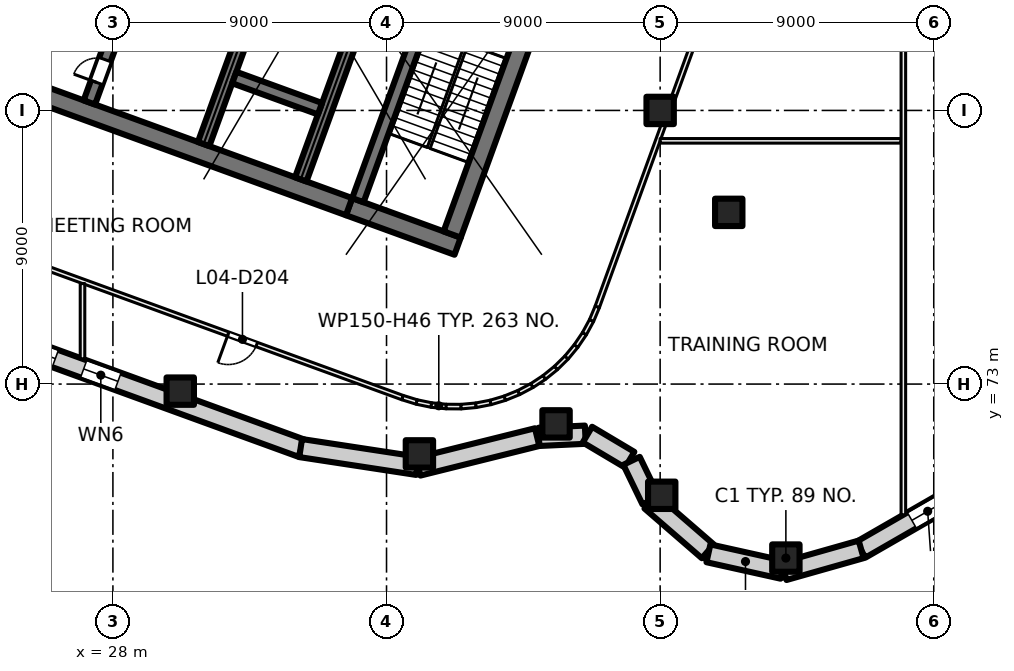
"""IFC4 building model, lengths in metres.
Left out: names, types, materials, properties, quantities, classifications, styles, units other than length and angle.
Written with IfcOpenShell. Run it as: python <this file> out.ifc"""

import sys

from ifc_helpers import new_model, si_unit, direction, frame, frame_2d, origin, origin_2d, place, context, subcontext, project, spatial, rectangle, extrude, element, fill, save


model = new_model("IFC4")
c1 = context("Model", 3, precision=1e-05, world=origin(), true_north=direction((0.0, 1.0)))
c2 = subcontext(c1, "Body", "Model", "MODEL_VIEW")
j1 = project(units=[si_unit("LENGTHUNIT", "METRE"), si_unit("PLANEANGLEUNIT", "RADIAN")], contexts=[c1])
p1 = place(None, origin())
s1 = spatial("IfcSite", under=j1, at=p1, CompositionType="ELEMENT")
p2 = place(p1, origin())
s2 = spatial("IfcBuilding", under=s1, at=p2, CompositionType="ELEMENT")
p3 = place(p2, frame((0.0, 0.0, 22.5)))
s3 = spatial("IfcBuildingStorey", under=s2, at=p3, CompositionType="ELEMENT", Elevation=22.5)
for number, where, z_axis, x_axis in (
    (1, (46.0, 82.0, 0.0), (0.0, 0.0, 1.0), (1.0, 0.0, 0.0)),
    (2, (50.135, 67.277, 0.0), (0.0, 0.0, 1.0), (1.0, 0.0, 0.0)),
    (3, (46.052, 69.342, 0.0), (0.0, 0.0, 1.0), (1.0, 0.0, 0.0)),
    (4, (42.576, 71.691, 0.0), (0.0, 0.0, 1.0), (1.0, 0.0, 0.0)),
    (5, (38.082, 70.704, 0.0), (0.0, 0.0, 1.0), (1.0, 0.0, 0.0)),
    (6, (30.215, 72.768, 0.0), (0.0, 0.0, 1.0), (1.0, 0.0, 0.0)),
    (7, (48.257, 78.648, 0.0), (0.0, 0.0, 1.0), (1.0, 0.0, 0.0)),
):
    element("IfcColumn", number, at=place(p3, frame(where, z_axis=z_axis, x_axis=x_axis)), inside=s3, PredefinedType="COLUMN", context=c2, shape_type="SweptSolid", body=[
        extrude(rectangle(XDim=0.9, YDim=0.9, at=origin_2d()), origin(), (0.0, 0.0, 1.0), 5.0),
    ])
p4 = place(p3, frame((39.338, 77.535, 0.0), z_axis=(0.0, 0.0, 1.0), x_axis=(-0.939701471648, 0.341995824804, 0.0)))
e8 = element("IfcWall", 8, at=p4, inside=s3, PredefinedType="SHEAR", context=c2, shape_type="SweptSolid", body=[
    extrude(rectangle(XDim=3.8, YDim=0.6, at=frame_2d((1.9, 0.0))), origin(), (0.0, 0.0, 1.0), 5.0),
])
p5 = place(p3, frame((35.767, 78.835, 0.0), z_axis=(0.0, 0.0, 1.0), x_axis=(-0.939692894512, 0.342019391267, 0.0)))
e9 = element("IfcWall", 9, at=p5, inside=s3, PredefinedType="SHEAR", context=c2, shape_type="SweptSolid", body=[
    extrude(rectangle(XDim=14.4, YDim=0.6, at=frame_2d((7.2, 0.0))), origin(), (0.0, 0.0, 1.0), 5.0),
])
p6 = place(p3, frame((39.159, 77.92, 0.0), z_axis=(0.0, 0.0, 1.0), x_axis=(0.342016982193, 0.939693771338, 0.0)))
e10 = element("IfcWall", 10, at=p6, inside=s3, PredefinedType="SHEAR", context=c2, shape_type="SweptSolid", body=[
    extrude(rectangle(XDim=7.8, YDim=0.6, at=frame_2d((3.9, 0.0))), origin(), (0.0, 0.0, 1.0), 5.0),
])
p7 = place(p3, frame((36.058, 79.048, 0.0), z_axis=(0.0, 0.0, 1.0), x_axis=(0.342016982193, 0.939693771338, 0.0)))
e11 = element("IfcWall", 11, at=p7, inside=s3, PredefinedType="SHEAR", context=c2, shape_type="SweptSolid", body=[
    extrude(rectangle(XDim=7.8, YDim=0.4, at=frame_2d((3.9, 0.0))), origin(), (0.0, 0.0, 1.0), 5.0),
])
p8 = place(p3, frame((30.984, 80.895, 0.0), z_axis=(0.0, 0.0, 1.0), x_axis=(0.342021021735, 0.939692301071, 0.0)))
e12 = element("IfcWall", 12, at=p8, inside=s3, PredefinedType="SHEAR", context=c2, shape_type="SweptSolid", body=[
    extrude(rectangle(XDim=12.2, YDim=0.4, at=frame_2d((6.1, 0.0))), origin(), (0.0, 0.0, 1.0), 5.0),
])
p9 = place(p8, frame((5.45, 0.0, 0.0)))
e13 = element("IfcOpeningElement", 13, at=p9, cuts=e12, PredefinedType="OPENING", context=c2, shape_type="SweptSolid", body=[
    extrude(rectangle(XDim=1.1, YDim=2.1, at=frame_2d((0.55, 1.05))), frame((0.0, 0.21, 0.0), z_axis=(0.0, -1.0, 0.0), x_axis=(1.0, 0.0, 0.0)), (0.0, 0.0, 1.0), 0.42),
])
p10 = place(p8, frame((7.85, 0.0, 0.0)))
e14 = element("IfcOpeningElement", 14, at=p10, cuts=e12, PredefinedType="OPENING", context=c2, shape_type="SweptSolid", body=[
    extrude(rectangle(XDim=1.1, YDim=2.1, at=frame_2d((0.55, 1.05))), frame((0.0, 0.21, 0.0), z_axis=(0.0, -1.0, 0.0), x_axis=(1.0, 0.0, 0.0)), (0.0, 0.0, 1.0), 0.42),
])
p11 = place(p8, frame((10.25, 0.0, 0.0)))
e15 = element("IfcOpeningElement", 15, at=p11, cuts=e12, PredefinedType="OPENING", context=c2, shape_type="SweptSolid", body=[
    extrude(rectangle(XDim=1.1, YDim=2.1, at=frame_2d((0.55, 1.05))), frame((0.0, 0.21, 0.0), z_axis=(0.0, -1.0, 0.0), x_axis=(1.0, 0.0, 0.0)), (0.0, 0.0, 1.0), 0.42),
])
p12 = place(p3, frame((34.178, 79.732, 0.0), z_axis=(0.0, 0.0, 1.0), x_axis=(0.342014590177, 0.939694641948, 0.0)))
e16 = element("IfcWall", 16, at=p12, inside=s3, PredefinedType="SHEAR", context=c2, shape_type="SweptSolid", body=[
    extrude(rectangle(XDim=12.2, YDim=0.4, at=frame_2d((6.1, 0.0))), origin(), (0.0, 0.0, 1.0), 5.0),
])
p13 = place(p3, frame((34.812, 82.056, 0.0), z_axis=(0.0, 0.0, 1.0), x_axis=(-0.939686455819, 0.342037080957, 0.0)))
e17 = element("IfcWall", 17, at=p13, inside=s3, PredefinedType="SHEAR", context=c2, shape_type="SweptSolid", body=[
    extrude(rectangle(XDim=3.0, YDim=0.4, at=frame_2d((1.5, 0.0))), origin(), (0.0, 0.0, 1.0), 5.0),
])
p14 = place(p3, frame((27.225, 82.263, 0.0), z_axis=(0.0, 0.0, 1.0), x_axis=(0.342014590177, 0.939694641948, 0.0)))
e18 = element("IfcWall", 18, at=p14, inside=s3, PredefinedType="SHEAR", context=c2, shape_type="SweptSolid", body=[
    extrude(rectangle(XDim=12.2, YDim=0.4, at=frame_2d((6.1, 0.0))), origin(), (0.0, 0.0, 1.0), 5.0),
])
p15 = place(p14, frame((10.25, 0.0, 0.0)))
e19 = element("IfcOpeningElement", 19, at=p15, cuts=e18, PredefinedType="OPENING", context=c2, shape_type="SweptSolid", body=[
    extrude(rectangle(XDim=1.1, YDim=2.1, at=frame_2d((0.55, 1.05))), frame((0.0, 0.21, 0.0), z_axis=(0.0, -1.0, 0.0), x_axis=(1.0, 0.0, 0.0)), (0.0, 0.0, 1.0), 0.42),
])
p16 = place(p14, frame((0.7, 0.0, 0.0)))
e20 = element("IfcOpeningElement", 20, at=p16, cuts=e18, PredefinedType="OPENING", context=c2, shape_type="SweptSolid", body=[
    extrude(rectangle(XDim=0.8, YDim=2.1, at=frame_2d((0.4, 1.05))), frame((0.0, 0.21, 0.0), z_axis=(0.0, -1.0, 0.0), x_axis=(1.0, 0.0, 0.0)), (0.0, 0.0, 1.0), 0.42),
])
p17 = place(p3, frame((24.03, 83.426, 0.0), z_axis=(0.0, 0.0, 1.0), x_axis=(0.342014590177, 0.939694641948, 0.0)))
e21 = element("IfcWall", 21, at=p17, inside=s3, PredefinedType="SHEAR", context=c2, shape_type="SweptSolid", body=[
    extrude(rectangle(XDim=12.2, YDim=0.4, at=frame_2d((6.1, 0.0))), origin(), (0.0, 0.0, 1.0), 5.0),
])
p18 = place(p17, frame((7.9, 0.0, 0.0)))
e22 = element("IfcOpeningElement", 22, at=p18, cuts=e21, PredefinedType="OPENING", context=c2, shape_type="SweptSolid", body=[
    extrude(rectangle(XDim=1.1, YDim=2.1, at=frame_2d((0.55, 1.05))), frame((0.0, 0.21, 0.0), z_axis=(0.0, -1.0, 0.0), x_axis=(1.0, 0.0, 0.0)), (0.0, 0.0, 1.0), 0.42),
])
p19 = place(p3, frame((110.368, 100.798, 0.0), z_axis=(0.0, 0.0, 1.0), x_axis=(-0.866702553925, -0.498825303107, 0.0)))
e23 = element("IfcWall", 23, at=p19, inside=s3, PredefinedType="SOLIDWALL", context=c2, shape_type="SweptSolid", body=[
    extrude(rectangle(XDim=66.651, YDim=0.6, at=frame_2d((33.325, 0.0))), origin(), (0.0, 0.0, 1.0), 4.625),
])
p20 = place(p19, frame((0.794, 0.0, 0.9)))
e24 = element("IfcOpeningElement", 24, at=p20, cuts=e23, PredefinedType="OPENING", context=c2, shape_type="SweptSolid", body=[
    extrude(rectangle(XDim=3.0, YDim=3.0, at=frame_2d((1.5, 1.5))), frame((0.0, 0.31, 0.0), z_axis=(0.0, -1.0, 0.0), x_axis=(1.0, 0.0, 0.0)), (0.0, 0.0, 1.0), 0.62),
])
p21 = place(p19, frame((9.542, 0.0, 0.9)))
e25 = element("IfcOpeningElement", 25, at=p21, cuts=e23, PredefinedType="OPENING", context=c2, shape_type="SweptSolid", body=[
    extrude(rectangle(XDim=3.0, YDim=3.0, at=frame_2d((1.5, 1.5))), frame((0.0, 0.31, 0.0), z_axis=(0.0, -1.0, 0.0), x_axis=(1.0, 0.0, 0.0)), (0.0, 0.0, 1.0), 0.62),
])
p22 = place(p19, frame((18.439, 0.0, 0.9)))
e26 = element("IfcOpeningElement", 26, at=p22, cuts=e23, PredefinedType="OPENING", context=c2, shape_type="SweptSolid", body=[
    extrude(rectangle(XDim=3.0, YDim=3.0, at=frame_2d((1.5, 1.5))), frame((0.0, 0.31, 0.0), z_axis=(0.0, -1.0, 0.0), x_axis=(1.0, 0.0, 0.0)), (0.0, 0.0, 1.0), 0.62),
])
p23 = place(p19, frame((27.337, 0.0, 0.9)))
e27 = element("IfcOpeningElement", 27, at=p23, cuts=e23, PredefinedType="OPENING", context=c2, shape_type="SweptSolid", body=[
    extrude(rectangle(XDim=3.0, YDim=3.0, at=frame_2d((1.5, 1.5))), frame((0.0, 0.31, 0.0), z_axis=(0.0, -1.0, 0.0), x_axis=(1.0, 0.0, 0.0)), (0.0, 0.0, 1.0), 0.62),
])
p24 = place(p19, frame((36.234, 0.0, 0.9)))
e28 = element("IfcOpeningElement", 28, at=p24, cuts=e23, PredefinedType="OPENING", context=c2, shape_type="SweptSolid", body=[
    extrude(rectangle(XDim=3.0, YDim=3.0, at=frame_2d((1.5, 1.5))), frame((0.0, 0.31, 0.0), z_axis=(0.0, -1.0, 0.0), x_axis=(1.0, 0.0, 0.0)), (0.0, 0.0, 1.0), 0.62),
])
p25 = place(p19, frame((45.131, 0.0, 0.9)))
e29 = element("IfcOpeningElement", 29, at=p25, cuts=e23, PredefinedType="OPENING", context=c2, shape_type="SweptSolid", body=[
    extrude(rectangle(XDim=3.0, YDim=3.0, at=frame_2d((1.5, 1.5))), frame((0.0, 0.31, 0.0), z_axis=(0.0, -1.0, 0.0), x_axis=(1.0, 0.0, 0.0)), (0.0, 0.0, 1.0), 0.62),
])
p26 = place(p19, frame((54.029, 0.0, 0.9)))
e30 = element("IfcOpeningElement", 30, at=p26, cuts=e23, PredefinedType="OPENING", context=c2, shape_type="SweptSolid", body=[
    extrude(rectangle(XDim=3.0, YDim=3.0, at=frame_2d((1.5, 1.5))), frame((0.0, 0.31, 0.0), z_axis=(0.0, -1.0, 0.0), x_axis=(1.0, 0.0, 0.0)), (0.0, 0.0, 1.0), 0.62),
])
p27 = place(p19, frame((63.514, 0.0, 0.9)))
e31 = element("IfcOpeningElement", 31, at=p27, cuts=e23, PredefinedType="OPENING", context=c2, shape_type="SweptSolid", body=[
    extrude(rectangle(XDim=1.2, YDim=3.0, at=frame_2d((0.6, 1.5))), frame((0.0, 0.31, 0.0), z_axis=(0.0, -1.0, 0.0), x_axis=(1.0, 0.0, 0.0)), (0.0, 0.0, 1.0), 0.62),
])
p28 = place(p3, frame((34.204, 70.89, 0.0), z_axis=(0.0, 0.0, 1.0), x_axis=(-0.939693996621, 0.342016363227, 0.0)))
e32 = element("IfcWall", 32, at=p28, inside=s3, PredefinedType="SOLIDWALL", context=c2, shape_type="SweptSolid", body=[
    extrude(rectangle(XDim=16.926, YDim=0.6, at=frame_2d((8.463, 0.0))), origin(), (0.0, 0.0, 1.0), 4.625),
])
p29 = place(p28, frame((6.426, 0.0, 0.9)))
e33 = element("IfcOpeningElement", 33, at=p29, cuts=e32, PredefinedType="OPENING", context=c2, shape_type="SweptSolid", body=[
    extrude(rectangle(XDim=1.2, YDim=3.0, at=frame_2d((0.6, 1.5))), frame((0.0, 0.31, 0.0), z_axis=(0.0, -1.0, 0.0), x_axis=(1.0, 0.0, 0.0)), (0.0, 0.0, 1.0), 0.62),
])
p30 = place(p28, frame((8.618, 0.0, 0.9)))
e34 = element("IfcOpeningElement", 34, at=p30, cuts=e32, PredefinedType="OPENING", context=c2, shape_type="SweptSolid", body=[
    extrude(rectangle(XDim=3.0, YDim=3.0, at=frame_2d((1.5, 1.5))), frame((0.0, 0.31, 0.0), z_axis=(0.0, -1.0, 0.0), x_axis=(1.0, 0.0, 0.0)), (0.0, 0.0, 1.0), 0.62),
])
p31 = place(p3, frame((38.022, 70.308, 0.0), z_axis=(0.0, 0.0, 1.0), x_axis=(-0.98857030495, 0.150760578968, 0.0)))
e35 = element("IfcWall", 35, at=p31, inside=s3, PredefinedType="SOLIDWALL", context=c2, shape_type="SweptSolid", body=[
    extrude(rectangle(XDim=3.891, YDim=0.6, at=frame_2d((1.946, 0.0))), origin(), (0.0, 0.0, 1.0), 4.625),
])
p32 = place(p3, frame((41.954, 71.255, 0.0), z_axis=(0.0, 0.0, 1.0), x_axis=(-0.970377180078, -0.241594967628, 0.0)))
e36 = element("IfcWall", 36, at=p32, inside=s3, PredefinedType="SOLIDWALL", context=c2, shape_type="SweptSolid", body=[
    extrude(rectangle(XDim=4.031, YDim=0.6, at=frame_2d((2.016, 0.0))), origin(), (0.0, 0.0, 1.0), 4.625),
])
p33 = place(p3, frame((43.538, 71.335, 0.0), z_axis=(0.0, 0.0, 1.0), x_axis=(-0.998910056035, -0.046676546065, 0.0)))
e37 = element("IfcWall", 37, at=p33, inside=s3, PredefinedType="SOLIDWALL", context=c2, shape_type="SweptSolid", body=[
    extrude(rectangle(XDim=1.527, YDim=0.6, at=frame_2d((0.764, 0.0))), origin(), (0.0, 0.0, 1.0), 4.625),
])
p34 = place(p3, frame((44.998, 70.511, 0.0), z_axis=(0.0, 0.0, 1.0), x_axis=(-0.859405023985, 0.511295418275, 0.0)))
e38 = element("IfcWall", 38, at=p34, inside=s3, PredefinedType="SOLIDWALL", context=c2, shape_type="SweptSolid", body=[
    extrude(rectangle(XDim=1.617, YDim=0.6, at=frame_2d((0.809, 0.0))), origin(), (0.0, 0.0, 1.0), 4.625),
])
p35 = place(p3, frame((45.689, 69.173, 0.0), z_axis=(0.0, 0.0, 1.0), x_axis=(-0.435706421579, 0.900088836835, 0.0)))
e39 = element("IfcWall", 39, at=p35, inside=s3, PredefinedType="SOLIDWALL", context=c2, shape_type="SweptSolid", body=[
    extrude(rectangle(XDim=1.447, YDim=0.6, at=frame_2d((0.724, 0.0))), origin(), (0.0, 0.0, 1.0), 4.625),
])
for number, where, z_axis, x_axis in (
    (40, (47.569, 67.499, 0.0), (0.0, 0.0, 1.0), (-0.756, 0.655, 0.0)),
    (41, (50.026, 66.892, 0.0), (0.0, 0.0, 1.0), (-0.976, 0.217, 0.0)),
):
    element("IfcWall", number, at=place(p3, frame(where, z_axis=z_axis, x_axis=x_axis)), inside=s3, PredefinedType="SOLIDWALL", context=c2, shape_type="SweptSolid", body=[
        extrude(rectangle(XDim=2.497, YDim=0.6, at=frame_2d((1.249, 0.0))), origin(), (0.0, 0.0, 1.0), 4.625),
    ])
p36 = place(p3, frame((52.612, 67.563, 0.0), z_axis=(0.0, 0.0, 1.0), x_axis=(-0.962094751735, -0.272715398693, 0.0)))
e42 = element("IfcWall", 42, at=p36, inside=s3, PredefinedType="SOLIDWALL", context=c2, shape_type="SweptSolid", body=[
    extrude(rectangle(XDim=2.637, YDim=0.6, at=frame_2d((1.319, 0.0))), origin(), (0.0, 0.0, 1.0), 4.625),
])
p37 = place(p3, frame((37.528, 72.554, 0.0), z_axis=(0.0, 0.0, 1.0), x_axis=(-0.939693287343, 0.34201831197, 0.0)))
e43 = element("IfcWall", 43, at=p37, inside=s3, PredefinedType="PARTITIONING", context=c2, shape_type="SweptSolid", body=[
    extrude(rectangle(XDim=22.005, YDim=0.15, at=frame_2d((11.002, 0.0))), origin(), (0.0, 0.0, 1.0), 4.625),
])
p38 = place(p37, frame((16.101, 0.0, 0.0)))
e44 = element("IfcOpeningElement", 44, at=p38, cuts=e43, PredefinedType="OPENING", context=c2, shape_type="SweptSolid", body=[
    extrude(rectangle(XDim=1.0, YDim=2.1, at=frame_2d((0.5, 1.05))), frame((0.0, 0.085, 0.0), z_axis=(0.0, -1.0, 0.0), x_axis=(1.0, 0.0, 0.0)), (0.0, 0.0, 1.0), 0.17),
])
p39 = place(p37, frame((5.105, 0.0, 0.0)))
e45 = element("IfcOpeningElement", 45, at=p39, cuts=e43, PredefinedType="OPENING", context=c2, shape_type="SweptSolid", body=[
    extrude(rectangle(XDim=1.0, YDim=2.1, at=frame_2d((0.5, 1.05))), frame((0.0, 0.085, 0.0), z_axis=(0.0, -1.0, 0.0), x_axis=(1.0, 0.0, 0.0)), (0.0, 0.0, 1.0), 0.17),
])
p40 = place(p3, frame((27.0, 73.832, 0.0), z_axis=(0.0, 0.0, 1.0), x_axis=(0.0, 1.0, 0.0)))
e46 = element("IfcWall", 46, at=p40, inside=s3, PredefinedType="PARTITIONING", context=c2, shape_type="SweptSolid", body=[
    extrude(rectangle(XDim=2.474, YDim=0.15, at=frame_2d((1.237, 0.0))), origin(), (0.0, 0.0, 1.0), 4.625),
])
p41 = place(p3, frame((37.524, 72.556, 0.0), z_axis=(0.0, 0.0, 1.0), x_axis=(0.954987142797, -0.296647192964, 0.0)))
e47 = element("IfcWall", 47, at=p41, inside=s3, PredefinedType="PARTITIONING", context=c2, shape_type="SweptSolid", body=[
    extrude(rectangle(XDim=0.495, YDim=0.15, at=frame_2d((0.248, 0.0))), origin(), (0.0, 0.0, 1.0), 4.625),
])
p42 = place(p3, frame((37.99, 72.411, 0.0), z_axis=(0.0, 0.0, 1.0), x_axis=(0.979397350706, -0.201942638962, 0.0)))
e48 = element("IfcWall", 48, at=p42, inside=s3, PredefinedType="PARTITIONING", context=c2, shape_type="SweptSolid", body=[
    extrude(rectangle(XDim=0.499, YDim=0.15, at=frame_2d((0.25, 0.0))), origin(), (0.0, 0.0, 1.0), 4.625),
])
p43 = place(p3, frame((38.471, 72.311, 0.0), z_axis=(0.0, 0.0, 1.0), x_axis=(0.994949544905, -0.100376307434, 0.0)))
e49 = element("IfcWall", 49, at=p43, inside=s3, PredefinedType="PARTITIONING", context=c2, shape_type="SweptSolid", body=[
    extrude(rectangle(XDim=0.499, YDim=0.15, at=frame_2d((0.249, 0.0))), origin(), (0.0, 0.0, 1.0), 4.625),
])
p44 = place(p3, frame((38.959, 72.261, 0.0), z_axis=(0.0, 0.0, 1.0), x_axis=(0.999982767056, -0.005870740315, 0.0)))
e50 = element("IfcWall", 50, at=p44, inside=s3, PredefinedType="PARTITIONING", context=c2, shape_type="SweptSolid", body=[
    extrude(rectangle(XDim=0.499, YDim=0.15, at=frame_2d((0.25, 0.0))), origin(), (0.0, 0.0, 1.0), 4.625),
])
p45 = place(p3, frame((39.45, 72.258, 0.0), z_axis=(0.0, 0.0, 1.0), x_axis=(0.995925282781, 0.090182210646, 0.0)))
e51 = element("IfcWall", 51, at=p45, inside=s3, PredefinedType="PARTITIONING", context=c2, shape_type="SweptSolid", body=[
    extrude(rectangle(XDim=0.498, YDim=0.15, at=frame_2d((0.249, 0.0))), origin(), (0.0, 0.0, 1.0), 4.625),
])
p46 = place(p3, frame((39.938, 72.302, 0.0), z_axis=(0.0, 0.0, 1.0), x_axis=(0.981729772821, 0.190280459207, 0.0)))
e52 = element("IfcWall", 52, at=p46, inside=s3, PredefinedType="PARTITIONING", context=c2, shape_type="SweptSolid", body=[
    extrude(rectangle(XDim=0.499, YDim=0.15, at=frame_2d((0.25, 0.0))), origin(), (0.0, 0.0, 1.0), 4.625),
])
p47 = place(p3, frame((40.42, 72.395, 0.0), z_axis=(0.0, 0.0, 1.0), x_axis=(0.958550811735, 0.284921640669, 0.0)))
e53 = element("IfcWall", 53, at=p47, inside=s3, PredefinedType="PARTITIONING", context=c2, shape_type="SweptSolid", body=[
    extrude(rectangle(XDim=0.499, YDim=0.15, at=frame_2d((0.25, 0.0))), origin(), (0.0, 0.0, 1.0), 4.625),
])
for number, where, z_axis, x_axis in (
    (54, (40.891, 72.535, 0.0), (0.0, 0.0, 1.0), (0.926, 0.378, 0.0)),
    (55, (41.346, 72.72, 0.0), (0.0, 0.0, 1.0), (0.884, 0.468, 0.0)),
):
    element("IfcWall", number, at=place(p3, frame(where, z_axis=z_axis, x_axis=x_axis)), inside=s3, PredefinedType="PARTITIONING", context=c2, shape_type="SweptSolid", body=[
        extrude(rectangle(XDim=0.498, YDim=0.15, at=frame_2d((0.249, 0.0))), origin(), (0.0, 0.0, 1.0), 4.625),
    ])
p48 = place(p3, frame((41.78, 72.949, 0.0), z_axis=(0.0, 0.0, 1.0), x_axis=(0.834609406562, 0.550842208331, 0.0)))
e56 = element("IfcWall", 56, at=p48, inside=s3, PredefinedType="PARTITIONING", context=c2, shape_type="SweptSolid", body=[
    extrude(rectangle(XDim=0.497, YDim=0.15, at=frame_2d((0.249, 0.0))), origin(), (0.0, 0.0, 1.0), 4.625),
])
p49 = place(p3, frame((42.189, 73.219, 0.0), z_axis=(0.0, 0.0, 1.0), x_axis=(0.777507544785, 0.628873610356, 0.0)))
e57 = element("IfcWall", 57, at=p49, inside=s3, PredefinedType="PARTITIONING", context=c2, shape_type="SweptSolid", body=[
    extrude(rectangle(XDim=0.498, YDim=0.15, at=frame_2d((0.249, 0.0))), origin(), (0.0, 0.0, 1.0), 4.625),
])
p50 = place(p3, frame((42.57, 73.527, 0.0), z_axis=(0.0, 0.0, 1.0), x_axis=(0.711252497293, 0.702936615275, 0.0)))
e58 = element("IfcWall", 58, at=p50, inside=s3, PredefinedType="PARTITIONING", context=c2, shape_type="SweptSolid", body=[
    extrude(rectangle(XDim=0.499, YDim=0.15, at=frame_2d((0.25, 0.0))), origin(), (0.0, 0.0, 1.0), 4.625),
])
p51 = place(p3, frame((42.92, 73.872, 0.0), z_axis=(0.0, 0.0, 1.0), x_axis=(0.636754760492, 0.771066388186, 0.0)))
e59 = element("IfcWall", 59, at=p51, inside=s3, PredefinedType="PARTITIONING", context=c2, shape_type="SweptSolid", body=[
    extrude(rectangle(XDim=0.498, YDim=0.15, at=frame_2d((0.249, 0.0))), origin(), (0.0, 0.0, 1.0), 4.625),
])
p52 = place(p3, frame((43.233, 74.25, 0.0), z_axis=(0.0, 0.0, 1.0), x_axis=(0.560685437924, 0.828028888203, 0.0)))
e60 = element("IfcWall", 60, at=p52, inside=s3, PredefinedType="PARTITIONING", context=c2, shape_type="SweptSolid", body=[
    extrude(rectangle(XDim=0.498, YDim=0.15, at=frame_2d((0.249, 0.0))), origin(), (0.0, 0.0, 1.0), 4.625),
])
p53 = place(p3, frame((43.508, 74.656, 0.0), z_axis=(0.0, 0.0, 1.0), x_axis=(0.47751332042, 0.878624509573, 0.0)))
e61 = element("IfcWall", 61, at=p53, inside=s3, PredefinedType="PARTITIONING", context=c2, shape_type="SweptSolid", body=[
    extrude(rectangle(XDim=0.499, YDim=0.15, at=frame_2d((0.249, 0.0))), origin(), (0.0, 0.0, 1.0), 4.625),
])
p54 = place(p3, frame((43.743, 75.088, 0.0), z_axis=(0.0, 0.0, 1.0), x_axis=(0.387550596891, 0.921848433773, 0.0)))
e62 = element("IfcWall", 62, at=p54, inside=s3, PredefinedType="PARTITIONING", context=c2, shape_type="SweptSolid", body=[
    extrude(rectangle(XDim=0.496, YDim=0.15, at=frame_2d((0.248, 0.0))), origin(), (0.0, 0.0, 1.0), 4.625),
])
p55 = place(p3, frame((49.749, 91.52, 0.0), z_axis=(0.0, 0.0, 1.0), x_axis=(-0.342022021776, -0.939691937084, 0.0)))
e63 = element("IfcWall", 63, at=p55, inside=s3, PredefinedType="PARTITIONING", context=c2, shape_type="SweptSolid", body=[
    extrude(rectangle(XDim=17.004, YDim=0.15, at=frame_2d((8.502, 0.0))), origin(), (0.0, 0.0, 1.0), 4.625),
])
p56 = place(p55, frame((5.101, 0.0, 0.0)))
e64 = element("IfcOpeningElement", 64, at=p56, cuts=e63, PredefinedType="OPENING", context=c2, shape_type="SweptSolid", body=[
    extrude(rectangle(XDim=1.0, YDim=2.1, at=frame_2d((0.5, 1.05))), frame((0.0, 0.085, 0.0), z_axis=(0.0, -1.0, 0.0), x_axis=(1.0, 0.0, 0.0)), (0.0, 0.0, 1.0), 0.17),
])
p57 = place(p3, frame((46.0, 81.0, 0.0), z_axis=(0.0, 0.0, 1.0), x_axis=(1.0, 0.0, 0.0)))
e65 = element("IfcWall", 65, at=p57, inside=s3, PredefinedType="PARTITIONING", context=c2, shape_type="SweptSolid", body=[
    extrude(rectangle(XDim=7.925, YDim=0.15, at=frame_2d((3.962, 0.0))), origin(), (0.0, 0.0, 1.0), 4.625),
])
p58 = place(p3, frame((54.0, 68.702, 0.0), z_axis=(0.0, 0.0, 1.0), x_axis=(0.0, 1.0, 0.0)))
e66 = element("IfcWall", 66, at=p58, inside=s3, PredefinedType="PARTITIONING", context=c2, shape_type="SweptSolid", body=[
    extrude(rectangle(XDim=39.223, YDim=0.15, at=frame_2d((19.612, 0.0))), origin(), (0.0, 0.0, 1.0), 4.625),
])
p59 = place(p27, origin())
e67 = element("IfcWindow", 67, at=p59, inside=s3, PartitioningType="SINGLE_PANEL", PredefinedType="WINDOW", context=c2, shape_type="SweptSolid", body=[
    extrude(rectangle(XDim=1.2, YDim=3.0, at=frame_2d((0.6, 1.5))), frame((0.0, 0.03, 0.0), z_axis=(0.0, -1.0, 0.0), x_axis=(1.0, 0.0, 0.0)), (0.0, 0.0, 1.0), 0.06),
])
fill(e31, e67)
p60 = place(p29, origin())
e68 = element("IfcWindow", 68, at=p60, inside=s3, PartitioningType="SINGLE_PANEL", PredefinedType="WINDOW", context=c2, shape_type="SweptSolid", body=[
    extrude(rectangle(XDim=1.2, YDim=3.0, at=frame_2d((0.6, 1.5))), frame((0.0, 0.03, 0.0), z_axis=(0.0, -1.0, 0.0), x_axis=(1.0, 0.0, 0.0)), (0.0, 0.0, 1.0), 0.06),
])
fill(e33, e68)
p61 = place(p30, origin())
e69 = element("IfcWindow", 69, at=p61, inside=s3, PartitioningType="SINGLE_PANEL", PredefinedType="WINDOW", context=c2, shape_type="SweptSolid", body=[
    extrude(rectangle(XDim=3.0, YDim=3.0, at=frame_2d((1.5, 1.5))), frame((0.0, 0.03, 0.0), z_axis=(0.0, -1.0, 0.0), x_axis=(1.0, 0.0, 0.0)), (0.0, 0.0, 1.0), 0.06),
])
fill(e34, e69)
p62 = place(p16, origin())
e70 = element("IfcDoor", 70, at=p62, inside=s3, OperationType="SINGLE_SWING_LEFT", PredefinedType="DOOR", context=c2, shape_type="SweptSolid", body=[
    extrude(rectangle(XDim=0.8, YDim=2.1, at=frame_2d((0.4, 1.05))), frame((0.0, 0.025, 0.0), z_axis=(0.0, -1.0, 0.0), x_axis=(1.0, 0.0, 0.0)), (0.0, 0.0, 1.0), 0.05),
])
fill(e20, e70)
p63 = place(p39, origin())
e71 = element("IfcDoor", 71, at=p63, inside=s3, OperationType="SINGLE_SWING_RIGHT", PredefinedType="DOOR", context=c2, shape_type="SweptSolid", body=[
    extrude(rectangle(XDim=1.0, YDim=2.1, at=frame_2d((0.5, 1.05))), frame((0.0, 0.025, 0.0), z_axis=(0.0, -1.0, 0.0), x_axis=(1.0, 0.0, 0.0)), (0.0, 0.0, 1.0), 0.05),
])
fill(e45, e71)
save(model, sys.argv[1])
